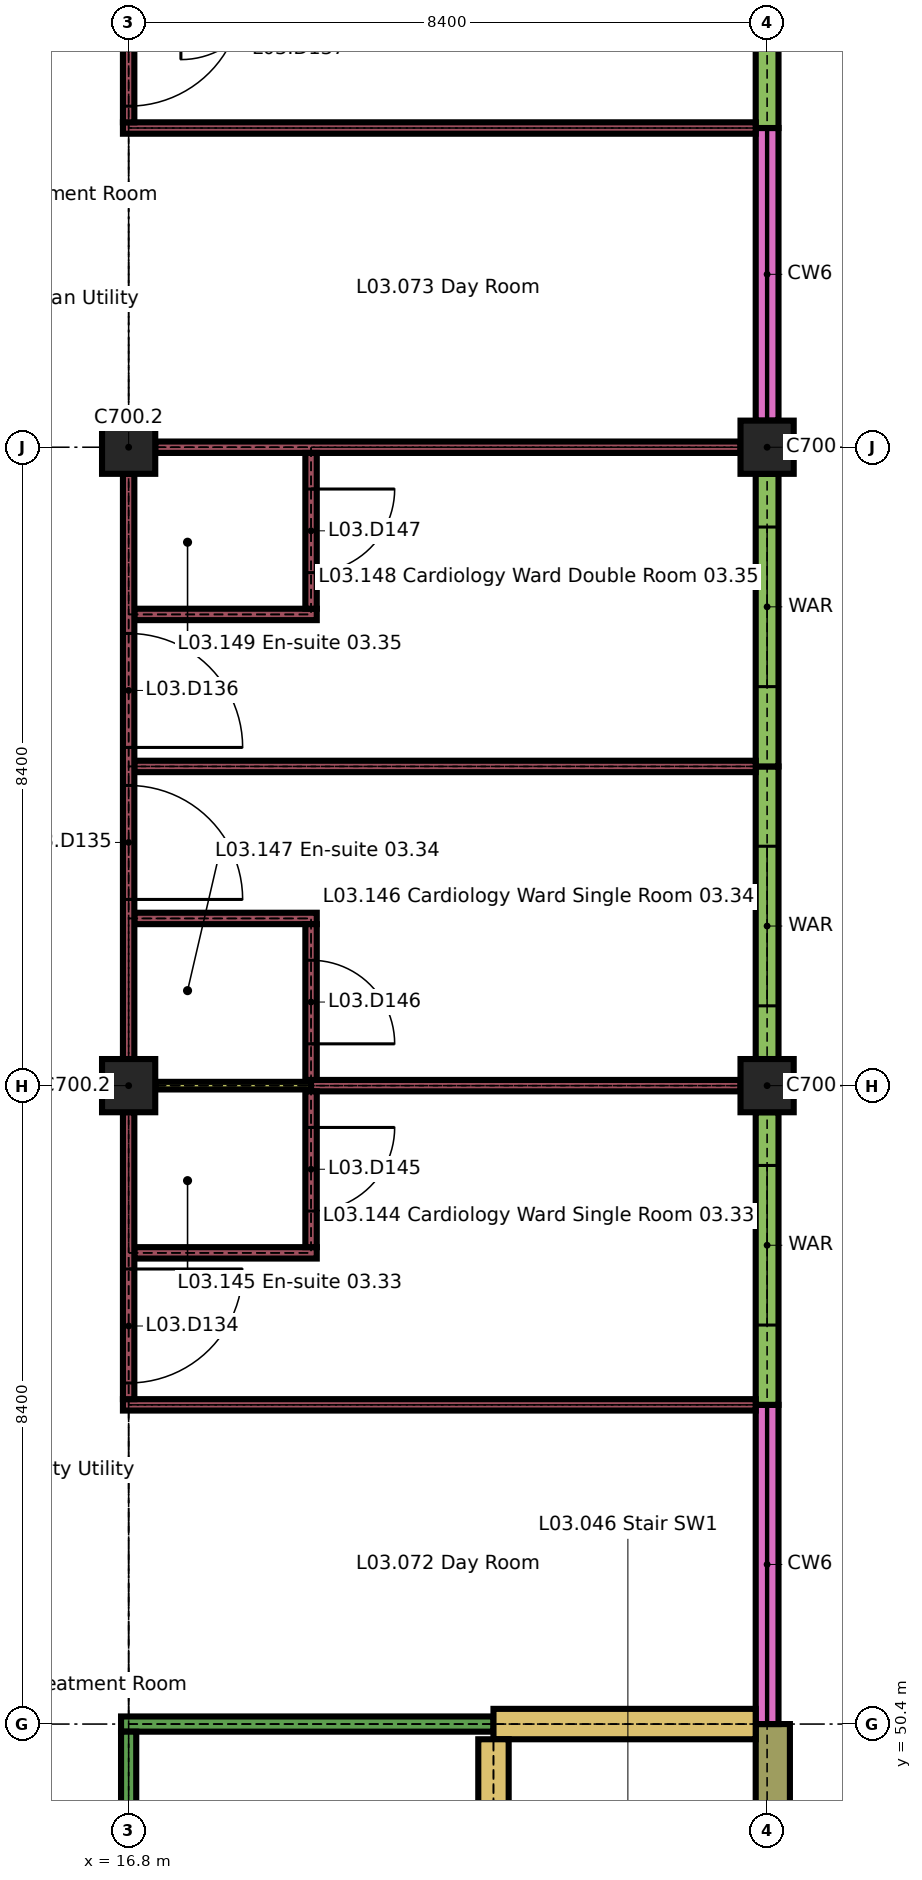
"""IFC4 building model, lengths in metres.
Left out: names, types, materials, properties, quantities, classifications, styles, units other than length and angle.
Written with IfcOpenShell. Run it as: python <this file> out.ifc"""

import sys

from ifc_helpers import new_model, si_unit, direction, frame, frame_2d, origin, origin_2d, place, context, subcontext, project, spatial, rectangle, extrude, element, fill, save


model = new_model("IFC4")
c1 = context("Model", 3, precision=1e-05, world=origin(), true_north=direction((0.0, 1.0)))
c2 = subcontext(c1, "Body", "Model", "MODEL_VIEW")
j1 = project(units=[si_unit("LENGTHUNIT", "METRE"), si_unit("PLANEANGLEUNIT", "RADIAN")], contexts=[c1])
p1 = place(None, origin())
s1 = spatial("IfcSite", under=j1, at=p1, CompositionType="ELEMENT")
p2 = place(p1, origin())
s2 = spatial("IfcBuilding", under=s1, at=p2, CompositionType="ELEMENT")
p3 = place(p2, frame((0.0, 0.0, 15.3)))
s3 = spatial("IfcBuildingStorey", under=s2, at=p3, CompositionType="ELEMENT", Elevation=15.3)
for number, where, z_axis, x_axis in (
    (1, (16.8, 58.8, 0.0), (0.0, 0.0, 1.0), (1.0, 0.0, 0.0)),
    (2, (25.2, 58.8, 0.0), (0.0, 0.0, 1.0), (1.0, 0.0, 0.0)),
    (3, (16.8, 67.2, 0.0), (0.0, 0.0, 1.0), (1.0, 0.0, 0.0)),
    (4, (25.2, 67.2, 0.0), (0.0, 0.0, 1.0), (1.0, 0.0, 0.0)),
):
    element("IfcColumn", number, at=place(p3, frame(where, z_axis=z_axis, x_axis=x_axis)), inside=s3, PredefinedType="COLUMN", context=c2, shape_type="SweptSolid", body=[
        extrude(rectangle(XDim=0.7, YDim=0.7, at=origin_2d()), origin(), (0.0, 0.0, 1.0), 3.26),
    ])
p4 = place(p3, frame((25.275, 46.55, 0.0), z_axis=(0.0, 0.0, 1.0), x_axis=(0.0, 1.0, 0.0)))
e5 = element("IfcWall", 5, at=p4, inside=s3, PredefinedType="SOLIDWALL", context=c2, shape_type="SweptSolid", body=[
    extrude(rectangle(XDim=3.85, YDim=0.45, at=frame_2d((1.925, 0.0))), origin(), (0.0, 0.0, 1.0), 3.26),
])
p5 = place(p3, frame((25.2, 50.4, 0.0), z_axis=(0.0, 0.0, 1.0), x_axis=(0.0, 1.0, 0.0)))
e6 = element("IfcWall", 6, at=p5, inside=s3, PredefinedType="SOLIDWALL", context=c2, shape_type="SweptSolid", body=[
    extrude(rectangle(XDim=4.2, YDim=0.3, at=frame_2d((2.1, 0.0))), origin(), (0.0, 0.0, 1.0), 0.6),
])
p6 = place(p3, frame((25.2, 54.6, 0.0), z_axis=(0.0, 0.0, 1.0), x_axis=(0.0, 1.0, 0.0)))
e7 = element("IfcWall", 7, at=p6, inside=s3, PredefinedType="SOLIDWALL", context=c2, shape_type="SweptSolid", body=[
    extrude(rectangle(XDim=3.85, YDim=0.3, at=frame_2d((1.925, 0.0))), origin(), (0.0, 0.0, 1.0), 2.96),
])
p7 = place(p6, frame((1.05, 0.0, 0.9)))
e8 = element("IfcOpeningElement", 8, at=p7, cuts=e7, PredefinedType="OPENING", context=c2, shape_type="SweptSolid", body=[
    extrude(rectangle(XDim=2.1, YDim=1.5, at=frame_2d((1.05, 0.75))), frame((0.0, 0.16, 0.0), z_axis=(0.0, -1.0, 0.0), x_axis=(1.0, 0.0, 0.0)), (0.0, 0.0, 1.0), 0.32),
])
p8 = place(p3, frame((25.2, 59.15, 0.0), z_axis=(0.0, 0.0, 1.0), x_axis=(0.0, 1.0, 0.0)))
e9 = element("IfcWall", 9, at=p8, inside=s3, PredefinedType="SOLIDWALL", context=c2, shape_type="SweptSolid", body=[
    extrude(rectangle(XDim=3.85, YDim=0.3, at=frame_2d((1.925, 0.0))), origin(), (0.0, 0.0, 1.0), 2.96),
])
p9 = place(p8, frame((0.7, 0.0, 0.9)))
e10 = element("IfcOpeningElement", 10, at=p9, cuts=e9, PredefinedType="OPENING", context=c2, shape_type="SweptSolid", body=[
    extrude(rectangle(XDim=2.1, YDim=1.5, at=frame_2d((1.05, 0.75))), frame((0.0, 0.16, 0.0), z_axis=(0.0, -1.0, 0.0), x_axis=(1.0, 0.0, 0.0)), (0.0, 0.0, 1.0), 0.32),
])
p10 = place(p3, frame((25.2, 63.0, 0.0), z_axis=(0.0, 0.0, 1.0), x_axis=(0.0, 1.0, 0.0)))
e11 = element("IfcWall", 11, at=p10, inside=s3, PredefinedType="SOLIDWALL", context=c2, shape_type="SweptSolid", body=[
    extrude(rectangle(XDim=3.85, YDim=0.3, at=frame_2d((1.925, 0.0))), origin(), (0.0, 0.0, 1.0), 2.96),
])
p11 = place(p10, frame((1.05, 0.0, 0.9)))
e12 = element("IfcOpeningElement", 12, at=p11, cuts=e11, PredefinedType="OPENING", context=c2, shape_type="SweptSolid", body=[
    extrude(rectangle(XDim=2.1, YDim=1.5, at=frame_2d((1.05, 0.75))), frame((0.0, 0.16, 0.0), z_axis=(0.0, -1.0, 0.0), x_axis=(1.0, 0.0, 0.0)), (0.0, 0.0, 1.0), 0.32),
])
p12 = place(p3, frame((25.2, 67.55, 0.0), z_axis=(0.0, 0.0, 1.0), x_axis=(0.0, 1.0, 0.0)))
e13 = element("IfcWall", 13, at=p12, inside=s3, PredefinedType="SOLIDWALL", context=c2, shape_type="SweptSolid", body=[
    extrude(rectangle(XDim=3.85, YDim=0.3, at=frame_2d((1.925, 0.0))), origin(), (0.0, 0.0, 1.0), 0.6),
])
p13 = place(p3, frame((25.2, 71.4, 0.0), z_axis=(0.0, 0.0, 1.0), x_axis=(0.0, 1.0, 0.0)))
e14 = element("IfcWall", 14, at=p13, inside=s3, PredefinedType="SOLIDWALL", context=c2, shape_type="SweptSolid", body=[
    extrude(rectangle(XDim=4.2, YDim=0.3, at=frame_2d((2.1, 0.0))), origin(), (0.0, 0.0, 1.0), 2.96),
])
p14 = place(p13, frame((1.05, 0.0, 0.9)))
e15 = element("IfcOpeningElement", 15, at=p14, cuts=e14, PredefinedType="OPENING", context=c2, shape_type="SweptSolid", body=[
    extrude(rectangle(XDim=2.1, YDim=1.5, at=frame_2d((1.05, 0.75))), frame((0.0, 0.16, 0.0), z_axis=(0.0, -1.0, 0.0), x_axis=(1.0, 0.0, 0.0)), (0.0, 0.0, 1.0), 0.32),
])
p15 = place(p3, frame((16.7, 50.4, 0.0), z_axis=(0.0, 0.0, 1.0), x_axis=(1.0, 0.0, 0.0)))
e16 = element("IfcWall", 16, at=p15, inside=s3, PredefinedType="PARTITIONING", context=c2, shape_type="SweptSolid", body=[
    extrude(rectangle(XDim=4.9, YDim=0.2, at=frame_2d((2.45, 0.0))), origin(), (0.0, 0.0, 1.0), 3.26),
])
p16 = place(p3, frame((21.6, 50.4, 0.0), z_axis=(0.0, 0.0, 1.0), x_axis=(1.0, 0.0, 0.0)))
e17 = element("IfcWall", 17, at=p16, inside=s3, PredefinedType="SHEAR", context=c2, shape_type="SweptSolid", body=[
    extrude(rectangle(XDim=3.45, YDim=0.4, at=frame_2d((1.725, 0.0))), origin(), (0.0, 0.0, 1.0), 3.26),
])
p17 = place(p3, frame((16.725, 54.6, 0.0), z_axis=(0.0, 0.0, 1.0), x_axis=(1.0, 0.0, 0.0)))
e18 = element("IfcWall", 18, at=p17, inside=s3, PredefinedType="PARTITIONING", context=c2, shape_type="SweptSolid", body=[
    extrude(rectangle(XDim=8.325, YDim=0.15, at=frame_2d((4.163, 0.0))), origin(), (0.0, 0.0, 1.0), 3.26),
])
p18 = place(p3, frame((16.875, 56.6, 0.0), z_axis=(0.0, 0.0, 1.0), x_axis=(1.0, 0.0, 0.0)))
e19 = element("IfcWall", 19, at=p18, inside=s3, PredefinedType="PARTITIONING", context=c2, shape_type="SweptSolid", body=[
    extrude(rectangle(XDim=2.4, YDim=0.15, at=frame_2d((1.2, 0.0))), origin(), (0.0, 0.0, 1.0), 3.26),
])
p19 = place(p3, frame((17.15, 58.8, 0.0), z_axis=(0.0, 0.0, 1.0), x_axis=(1.0, 0.0, 0.0)))
e20 = element("IfcWall", 20, at=p19, inside=s3, PredefinedType="PARTITIONING", context=c2, shape_type="SweptSolid", body=[
    extrude(rectangle(XDim=2.05, YDim=0.1, at=frame_2d((1.025, 0.0))), origin(), (0.0, 0.0, 1.0), 3.26),
])
p20 = place(p3, frame((19.2, 58.8, 0.0), z_axis=(0.0, 0.0, 1.0), x_axis=(1.0, 0.0, 0.0)))
e21 = element("IfcWall", 21, at=p20, inside=s3, PredefinedType="PARTITIONING", context=c2, shape_type="SweptSolid", body=[
    extrude(rectangle(XDim=5.65, YDim=0.15, at=frame_2d((2.825, 0.0))), origin(), (0.0, 0.0, 1.0), 3.26),
])
p21 = place(p3, frame((16.875, 61.0, 0.0), z_axis=(0.0, 0.0, 1.0), x_axis=(1.0, 0.0, 0.0)))
e22 = element("IfcWall", 22, at=p21, inside=s3, PredefinedType="PARTITIONING", context=c2, shape_type="SweptSolid", body=[
    extrude(rectangle(XDim=2.4, YDim=0.15, at=frame_2d((1.2, 0.0))), origin(), (0.0, 0.0, 1.0), 3.26),
])
p22 = place(p3, frame((16.875, 63.0, 0.0), z_axis=(0.0, 0.0, 1.0), x_axis=(1.0, 0.0, 0.0)))
e23 = element("IfcWall", 23, at=p22, inside=s3, PredefinedType="PARTITIONING", context=c2, shape_type="SweptSolid", body=[
    extrude(rectangle(XDim=8.175, YDim=0.15, at=frame_2d((4.087, 0.0))), origin(), (0.0, 0.0, 1.0), 3.26),
])
p23 = place(p3, frame((16.875, 65.0, 0.0), z_axis=(0.0, 0.0, 1.0), x_axis=(1.0, 0.0, 0.0)))
e24 = element("IfcWall", 24, at=p23, inside=s3, PredefinedType="PARTITIONING", context=c2, shape_type="SweptSolid", body=[
    extrude(rectangle(XDim=2.4, YDim=0.15, at=frame_2d((1.2, 0.0))), origin(), (0.0, 0.0, 1.0), 3.26),
])
p24 = place(p3, frame((17.15, 67.2, 0.0), z_axis=(0.0, 0.0, 1.0), x_axis=(1.0, 0.0, 0.0)))
e25 = element("IfcWall", 25, at=p24, inside=s3, PredefinedType="PARTITIONING", context=c2, shape_type="SweptSolid", body=[
    extrude(rectangle(XDim=7.7, YDim=0.15, at=frame_2d((3.85, 0.0))), origin(), (0.0, 0.0, 1.0), 3.26),
])
p25 = place(p3, frame((16.725, 71.4, 0.0), z_axis=(0.0, 0.0, 1.0), x_axis=(1.0, 0.0, 0.0)))
e26 = element("IfcWall", 26, at=p25, inside=s3, PredefinedType="PARTITIONING", context=c2, shape_type="SweptSolid", body=[
    extrude(rectangle(XDim=8.325, YDim=0.15, at=frame_2d((4.163, 0.0))), origin(), (0.0, 0.0, 1.0), 3.26),
])
p26 = place(p3, frame((16.8, 42.0, 0.0), z_axis=(0.0, 0.0, 1.0), x_axis=(0.0, 1.0, 0.0)))
e27 = element("IfcWall", 27, at=p26, inside=s3, PredefinedType="PARTITIONING", context=c2, shape_type="SweptSolid", body=[
    extrude(rectangle(XDim=8.3, YDim=0.2, at=frame_2d((4.15, 0.0))), origin(), (0.0, 0.0, 1.0), 3.26),
])
p27 = place(p26, frame((3.15, 0.0, 0.0)))
e28 = element("IfcOpeningElement", 28, at=p27, cuts=e27, PredefinedType="OPENING", context=c2, shape_type="SweptSolid", body=[
    extrude(rectangle(XDim=2.0, YDim=2.4, at=frame_2d((1.0, 1.2))), frame((0.0, 0.11, 0.0), z_axis=(0.0, -1.0, 0.0), x_axis=(1.0, 0.0, 0.0)), (0.0, 0.0, 1.0), 0.22),
])
p28 = place(p3, frame((16.8, 54.675, 0.0), z_axis=(0.0, 0.0, 1.0), x_axis=(0.0, 1.0, 0.0)))
e29 = element("IfcWall", 29, at=p28, inside=s3, PredefinedType="PARTITIONING", context=c2, shape_type="SweptSolid", body=[
    extrude(rectangle(XDim=3.775, YDim=0.15, at=frame_2d((1.887, 0.0))), origin(), (0.0, 0.0, 1.0), 3.26),
])
p29 = place(p28, frame((0.212, 0.0, 0.0)))
e30 = element("IfcOpeningElement", 30, at=p29, cuts=e29, PredefinedType="OPENING", context=c2, shape_type="SweptSolid", body=[
    extrude(rectangle(XDim=1.5, YDim=2.4, at=frame_2d((0.75, 1.2))), frame((0.0, 0.085, 0.0), z_axis=(0.0, -1.0, 0.0), x_axis=(1.0, 0.0, 0.0)), (0.0, 0.0, 1.0), 0.17),
])
p30 = place(p3, frame((16.8, 59.15, 0.0), z_axis=(0.0, 0.0, 1.0), x_axis=(0.0, 1.0, 0.0)))
e31 = element("IfcWall", 31, at=p30, inside=s3, PredefinedType="PARTITIONING", context=c2, shape_type="SweptSolid", body=[
    extrude(rectangle(XDim=7.7, YDim=0.15, at=frame_2d((3.85, 0.0))), origin(), (0.0, 0.0, 1.0), 3.26),
])
p31 = place(p30, frame((2.1, 0.0, 0.0)))
e32 = element("IfcOpeningElement", 32, at=p31, cuts=e31, PredefinedType="OPENING", context=c2, shape_type="SweptSolid", body=[
    extrude(rectangle(XDim=1.5, YDim=2.4, at=frame_2d((0.75, 1.2))), frame((0.0, 0.085, 0.0), z_axis=(0.0, -1.0, 0.0), x_axis=(1.0, 0.0, 0.0)), (0.0, 0.0, 1.0), 0.17),
])
p32 = place(p30, frame((4.1, 0.0, 0.0)))
e33 = element("IfcOpeningElement", 33, at=p32, cuts=e31, PredefinedType="OPENING", context=c2, shape_type="SweptSolid", body=[
    extrude(rectangle(XDim=1.5, YDim=2.4, at=frame_2d((0.75, 1.2))), frame((0.0, 0.085, 0.0), z_axis=(0.0, -1.0, 0.0), x_axis=(1.0, 0.0, 0.0)), (0.0, 0.0, 1.0), 0.17),
])
p33 = place(p3, frame((16.8, 71.475, 0.0), z_axis=(0.0, 0.0, 1.0), x_axis=(0.0, 1.0, 0.0)))
e34 = element("IfcWall", 34, at=p33, inside=s3, PredefinedType="PARTITIONING", context=c2, shape_type="SweptSolid", body=[
    extrude(rectangle(XDim=4.125, YDim=0.15, at=frame_2d((2.062, 0.0))), origin(), (0.0, 0.0, 1.0), 3.26),
])
p34 = place(p33, frame((0.212, 0.0, 0.0)))
e35 = element("IfcOpeningElement", 35, at=p34, cuts=e34, PredefinedType="OPENING", context=c2, shape_type="SweptSolid", body=[
    extrude(rectangle(XDim=1.5, YDim=2.4, at=frame_2d((0.75, 1.2))), frame((0.0, 0.085, 0.0), z_axis=(0.0, -1.0, 0.0), x_axis=(1.0, 0.0, 0.0)), (0.0, 0.0, 1.0), 0.17),
])
p35 = place(p3, frame((19.2, 56.675, 0.0), z_axis=(0.0, 0.0, 1.0), x_axis=(0.0, 1.0, 0.0)))
e36 = element("IfcWall", 36, at=p35, inside=s3, PredefinedType="PARTITIONING", context=c2, shape_type="SweptSolid", body=[
    extrude(rectangle(XDim=2.05, YDim=0.15, at=frame_2d((1.025, 0.0))), origin(), (0.0, 0.0, 1.0), 3.26),
])
p36 = place(p35, frame((0.475, 0.0, 0.0)))
e37 = element("IfcOpeningElement", 37, at=p36, cuts=e36, PredefinedType="OPENING", context=c2, shape_type="SweptSolid", body=[
    extrude(rectangle(XDim=1.1, YDim=2.1, at=frame_2d((0.55, 1.05))), frame((0.0, 0.085, 0.0), z_axis=(0.0, -1.0, 0.0), x_axis=(1.0, 0.0, 0.0)), (0.0, 0.0, 1.0), 0.17),
])
p37 = place(p3, frame((19.2, 58.875, 0.0), z_axis=(0.0, 0.0, 1.0), x_axis=(0.0, 1.0, 0.0)))
e38 = element("IfcWall", 38, at=p37, inside=s3, PredefinedType="PARTITIONING", context=c2, shape_type="SweptSolid", body=[
    extrude(rectangle(XDim=2.05, YDim=0.15, at=frame_2d((1.025, 0.0))), origin(), (0.0, 0.0, 1.0), 3.26),
])
p38 = place(p37, frame((0.475, 0.0, 0.0)))
e39 = element("IfcOpeningElement", 39, at=p38, cuts=e38, PredefinedType="OPENING", context=c2, shape_type="SweptSolid", body=[
    extrude(rectangle(XDim=1.1, YDim=2.1, at=frame_2d((0.55, 1.05))), frame((0.0, 0.085, 0.0), z_axis=(0.0, -1.0, 0.0), x_axis=(1.0, 0.0, 0.0)), (0.0, 0.0, 1.0), 0.17),
])
p39 = place(p3, frame((19.2, 65.075, 0.0), z_axis=(0.0, 0.0, 1.0), x_axis=(0.0, 1.0, 0.0)))
e40 = element("IfcWall", 40, at=p39, inside=s3, PredefinedType="PARTITIONING", context=c2, shape_type="SweptSolid", body=[
    extrude(rectangle(XDim=2.05, YDim=0.15, at=frame_2d((1.025, 0.0))), origin(), (0.0, 0.0, 1.0), 3.26),
])
p40 = place(p39, frame((0.475, 0.0, 0.0)))
e41 = element("IfcOpeningElement", 41, at=p40, cuts=e40, PredefinedType="OPENING", context=c2, shape_type="SweptSolid", body=[
    extrude(rectangle(XDim=1.1, YDim=2.1, at=frame_2d((0.55, 1.05))), frame((0.0, 0.085, 0.0), z_axis=(0.0, -1.0, 0.0), x_axis=(1.0, 0.0, 0.0)), (0.0, 0.0, 1.0), 0.17),
])
p41 = place(p3, frame((21.6, 42.2, 0.0), z_axis=(0.0, 0.0, 1.0), x_axis=(0.0, 1.0, 0.0)))
e42 = element("IfcWall", 42, at=p41, inside=s3, PredefinedType="SHEAR", context=c2, shape_type="SweptSolid", body=[
    extrude(rectangle(XDim=8.0, YDim=0.4, at=frame_2d((4.0, 0.0))), origin(), (0.0, 0.0, 1.0), 3.26),
])
p42 = place(p41, frame((0.4, 0.0, 0.0)))
e43 = element("IfcOpeningElement", 43, at=p42, cuts=e42, PredefinedType="OPENING", context=c2, shape_type="SweptSolid", body=[
    extrude(rectangle(XDim=1.2, YDim=2.1, at=frame_2d((0.6, 1.05))), frame((0.0, 0.21, 0.0), z_axis=(0.0, -1.0, 0.0), x_axis=(1.0, 0.0, 0.0)), (0.0, 0.0, 1.0), 0.42),
])
p43 = place(p7, origin())
e44 = element("IfcWindow", 44, at=p43, inside=s3, PartitioningType="DOUBLE_PANEL_VERTICAL", PredefinedType="WINDOW", context=c2, shape_type="SweptSolid", body=[
    extrude(rectangle(XDim=2.1, YDim=1.5, at=frame_2d((1.05, 0.75))), frame((0.0, 0.05, 0.0), z_axis=(0.0, -1.0, 0.0), x_axis=(1.0, 0.0, 0.0)), (0.0, 0.0, 1.0), 0.1),
])
fill(e8, e44)
p44 = place(p9, origin())
e45 = element("IfcWindow", 45, at=p44, inside=s3, PartitioningType="DOUBLE_PANEL_VERTICAL", PredefinedType="WINDOW", context=c2, shape_type="SweptSolid", body=[
    extrude(rectangle(XDim=2.1, YDim=1.5, at=frame_2d((1.05, 0.75))), frame((0.0, 0.05, 0.0), z_axis=(0.0, -1.0, 0.0), x_axis=(1.0, 0.0, 0.0)), (0.0, 0.0, 1.0), 0.1),
])
fill(e10, e45)
p45 = place(p11, origin())
e46 = element("IfcWindow", 46, at=p45, inside=s3, PartitioningType="DOUBLE_PANEL_VERTICAL", PredefinedType="WINDOW", context=c2, shape_type="SweptSolid", body=[
    extrude(rectangle(XDim=2.1, YDim=1.5, at=frame_2d((1.05, 0.75))), frame((0.0, 0.05, 0.0), z_axis=(0.0, -1.0, 0.0), x_axis=(1.0, 0.0, 0.0)), (0.0, 0.0, 1.0), 0.1),
])
fill(e12, e46)
p46 = place(p29, origin())
e47 = element("IfcDoor", 47, at=p46, inside=s3, OperationType="SINGLE_SWING_RIGHT", PredefinedType="DOOR", context=c2, shape_type="SweptSolid", body=[
    extrude(rectangle(XDim=1.5, YDim=2.4, at=frame_2d((0.75, 1.2))), frame((0.0, 0.03, 0.0), z_axis=(0.0, -1.0, 0.0), x_axis=(1.0, 0.0, 0.0)), (0.0, 0.0, 1.0), 0.06),
])
fill(e30, e47)
p47 = place(p31, origin())
e48 = element("IfcDoor", 48, at=p47, inside=s3, OperationType="SINGLE_SWING_LEFT", PredefinedType="DOOR", context=c2, shape_type="SweptSolid", body=[
    extrude(rectangle(XDim=1.5, YDim=2.4, at=frame_2d((0.75, 1.2))), frame((0.0, 0.03, 0.0), z_axis=(0.0, -1.0, 0.0), x_axis=(1.0, 0.0, 0.0)), (0.0, 0.0, 1.0), 0.06),
])
fill(e32, e48)
p48 = place(p32, origin())
e49 = element("IfcDoor", 49, at=p48, inside=s3, OperationType="SINGLE_SWING_LEFT", PredefinedType="DOOR", context=c2, shape_type="SweptSolid", body=[
    extrude(rectangle(XDim=1.5, YDim=2.4, at=frame_2d((0.75, 1.2))), frame((0.0, 0.03, 0.0), z_axis=(0.0, -1.0, 0.0), x_axis=(1.0, 0.0, 0.0)), (0.0, 0.0, 1.0), 0.06),
])
fill(e33, e49)
p49 = place(p34, origin())
e50 = element("IfcDoor", 50, at=p49, inside=s3, OperationType="SINGLE_SWING_RIGHT", PredefinedType="DOOR", context=c2, shape_type="SweptSolid", body=[
    extrude(rectangle(XDim=1.5, YDim=2.4, at=frame_2d((0.75, 1.2))), frame((0.0, 0.03, 0.0), z_axis=(0.0, -1.0, 0.0), x_axis=(1.0, 0.0, 0.0)), (0.0, 0.0, 1.0), 0.06),
])
fill(e35, e50)
p50 = place(p36, origin())
e51 = element("IfcDoor", 51, at=p50, inside=s3, OperationType="SINGLE_SWING_RIGHT", PredefinedType="DOOR", context=c2, shape_type="SweptSolid", body=[
    extrude(rectangle(XDim=1.1, YDim=2.1, at=frame_2d((0.55, 1.05))), frame((0.0, 0.025, 0.0), z_axis=(0.0, -1.0, 0.0), x_axis=(1.0, 0.0, 0.0)), (0.0, 0.0, 1.0), 0.05),
])
fill(e37, e51)
p51 = place(p38, origin())
e52 = element("IfcDoor", 52, at=p51, inside=s3, OperationType="SINGLE_SWING_LEFT", PredefinedType="DOOR", context=c2, shape_type="SweptSolid", body=[
    extrude(rectangle(XDim=1.1, YDim=2.1, at=frame_2d((0.55, 1.05))), frame((0.0, 0.025, 0.0), z_axis=(0.0, -1.0, 0.0), x_axis=(1.0, 0.0, 0.0)), (0.0, 0.0, 1.0), 0.05),
])
fill(e39, e52)
p52 = place(p40, origin())
e53 = element("IfcDoor", 53, at=p52, inside=s3, OperationType="SINGLE_SWING_RIGHT", PredefinedType="DOOR", context=c2, shape_type="SweptSolid", body=[
    extrude(rectangle(XDim=1.1, YDim=2.1, at=frame_2d((0.55, 1.05))), frame((0.0, 0.025, 0.0), z_axis=(0.0, -1.0, 0.0), x_axis=(1.0, 0.0, 0.0)), (0.0, 0.0, 1.0), 0.05),
])
fill(e41, e53)
save(model, sys.argv[1])
